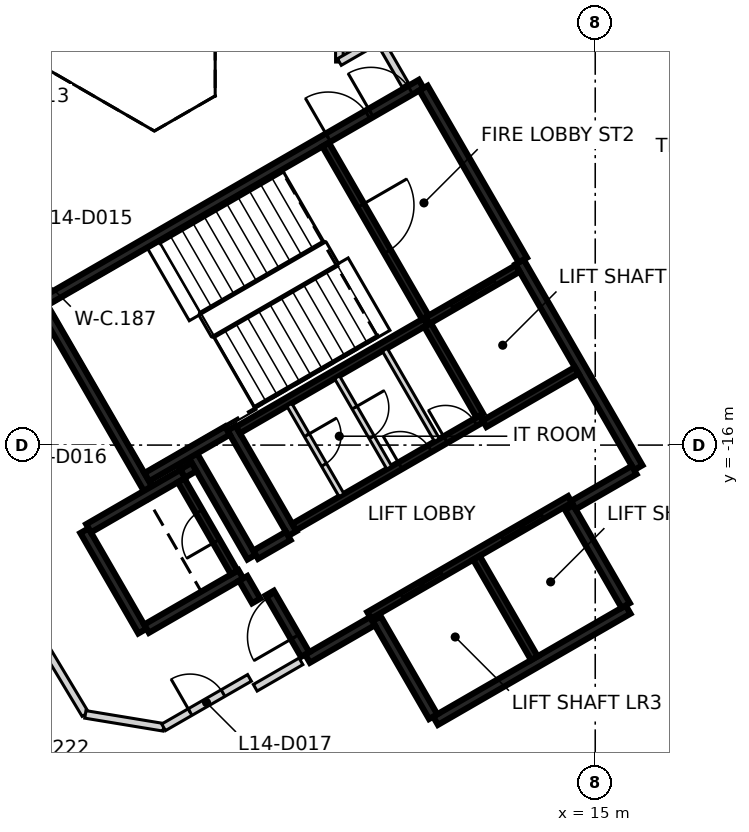
"""IFC4 building model, lengths in metres.
Left out: names, types, materials, properties, quantities, classifications, styles, units other than length and angle.
Written with IfcOpenShell. Run it as: python <this file> out.ifc"""

import sys

from ifc_helpers import new_model, si_unit, direction, frame, frame_2d, origin, place, context, subcontext, project, spatial, rectangle, extrude, element, fill, save


model = new_model("IFC4")
c1 = context("Model", 3, precision=1e-05, world=origin(), true_north=direction((0.0, 1.0)))
c2 = subcontext(c1, "Body", "Model", "MODEL_VIEW")
j1 = project(units=[si_unit("LENGTHUNIT", "METRE"), si_unit("PLANEANGLEUNIT", "RADIAN")], contexts=[c1])
p1 = place(None, origin())
s1 = spatial("IfcSite", under=j1, at=p1, CompositionType="ELEMENT")
p2 = place(p1, origin())
s2 = spatial("IfcBuilding", under=s1, at=p2, CompositionType="ELEMENT")
p3 = place(p2, frame((0.0, 0.0, 63.8)))
s3 = spatial("IfcBuildingStorey", under=s2, at=p3, CompositionType="ELEMENT", Elevation=63.8)
p4 = place(p3, frame((0.417, -12.273, 0.0), z_axis=(0.0, 0.0, 1.0), x_axis=(0.866021906294, 0.500006057782, 0.0)))
e1 = element("IfcWall", 1, at=p4, inside=s3, PredefinedType="SHEAR", context=c2, shape_type="SweptSolid", body=[
    extrude(rectangle(XDim=11.55, YDim=0.25, at=frame_2d((5.775, 0.0))), origin(), (0.0, 0.0, 1.0), 3.125),
])
p5 = place(p4, frame((10.025, 0.0, 0.0)))
e2 = element("IfcOpeningElement", 2, at=p5, cuts=e1, PredefinedType="OPENING", context=c2, shape_type="SweptSolid", body=[
    extrude(rectangle(XDim=1.2, YDim=2.1, at=frame_2d((0.6, 1.05))), frame((0.0, 0.135, 0.0), z_axis=(0.0, -1.0, 0.0), x_axis=(1.0, 0.0, 0.0)), (0.0, 0.0, 1.0), 0.27),
])
p6 = place(p4, frame((8.725, 0.0, 0.0)))
e3 = element("IfcOpeningElement", 3, at=p6, cuts=e1, PredefinedType="OPENING", context=c2, shape_type="SweptSolid", body=[
    extrude(rectangle(XDim=1.2, YDim=2.1, at=frame_2d((0.6, 1.05))), frame((0.0, 0.135, 0.0), z_axis=(0.0, -1.0, 0.0), x_axis=(1.0, 0.0, 0.0)), (0.0, 0.0, 1.0), 0.27),
])
p7 = place(p3, frame((13.008, -11.181, 0.0), z_axis=(0.0, 0.0, 1.0), x_axis=(0.500004234368, -0.866022959057, 0.0)))
e4 = element("IfcWall", 4, at=p7, inside=s3, PredefinedType="SHEAR", context=c2, shape_type="SweptSolid", body=[
    extrude(rectangle(XDim=6.25, YDim=0.25, at=frame_2d((3.125, 0.0))), origin(), (0.0, 0.0, 1.0), 3.125),
])
p8 = place(p3, frame((15.865, -20.328, 0.0), z_axis=(0.0, 0.0, 1.0), x_axis=(-0.86602852612, -0.499994591916, 0.0)))
e5 = element("IfcWall", 5, at=p8, inside=s3, PredefinedType="SHEAR", context=c2, shape_type="SweptSolid", body=[
    extrude(rectangle(XDim=5.85, YDim=0.25, at=frame_2d((2.925, 0.0))), origin(), (0.0, 0.0, 1.0), 3.125),
])
p9 = place(p3, frame((3.235, -17.153, 0.0), z_axis=(0.0, 0.0, 1.0), x_axis=(-0.500008851346, 0.866020293397, 0.0)))
e6 = element("IfcWall", 6, at=p9, inside=s3, PredefinedType="SHEAR", context=c2, shape_type="SweptSolid", body=[
    extrude(rectangle(XDim=5.51, YDim=0.25, at=frame_2d((2.755, 0.0))), origin(), (0.0, 0.0, 1.0), 3.125),
])
p10 = place(p3, frame((10.483, -6.606, 0.0), z_axis=(0.0, 0.0, 1.0), x_axis=(0.49999885962, -0.866026062182, 0.0)))
e7 = element("IfcWall", 7, at=p10, inside=s3, PredefinedType="SHEAR", context=c2, shape_type="SweptSolid", body=[
    extrude(rectangle(XDim=5.225, YDim=0.25, at=frame_2d((2.612, 0.0))), origin(), (0.0, 0.0, 1.0), 3.125),
])
p11 = place(p3, frame((7.031, -18.327, 0.0), z_axis=(0.0, 0.0, 1.0), x_axis=(-0.499971222258, 0.866042017984, 0.0)))
e8 = element("IfcWall", 8, at=p11, inside=s3, PredefinedType="SHEAR", context=c2, shape_type="SweptSolid", body=[
    extrude(rectangle(XDim=3.2, YDim=0.25, at=frame_2d((1.6, 0.0))), origin(), (0.0, 0.0, 1.0), 3.125),
])
for number, where, z_axis, x_axis in (
    (9, (14.315, -17.644, 0.0), (0.0, 0.0, 1.0), (0.5, -0.866, 0.0)),
    (10, (10.736, -23.145, 0.0), (0.0, 0.0, 1.0), (-0.5, 0.866, 0.0)),
):
    element("IfcWall", number, at=place(p3, frame(where, z_axis=z_axis, x_axis=x_axis)), inside=s3, PredefinedType="SHEAR", context=c2, shape_type="SweptSolid", body=[
        extrude(rectangle(XDim=2.974, YDim=0.25, at=frame_2d((1.487, 0.0))), origin(), (0.0, 0.0, 1.0), 3.125),
    ])
p12 = place(p3, frame((3.085, -20.894, 0.0), z_axis=(0.0, 0.0, 1.0), x_axis=(-0.499978833458, 0.866037623948, 0.0)))
e11 = element("IfcWall", 11, at=p12, inside=s3, PredefinedType="SHEAR", context=c2, shape_type="SweptSolid", body=[
    extrude(rectangle(XDim=3.05, YDim=0.25, at=frame_2d((1.525, 0.0))), origin(), (0.0, 0.0, 1.0), 3.125),
])
p13 = place(p3, frame((1.669, -18.19, 0.0), z_axis=(0.0, 0.0, 1.0), x_axis=(0.866042235819, 0.499970844928, 0.0)))
e12 = element("IfcWall", 12, at=p13, inside=s3, PredefinedType="SHEAR", context=c2, shape_type="SweptSolid", body=[
    extrude(rectangle(XDim=2.865, YDim=0.25, at=frame_2d((1.432, 0.0))), origin(), (0.0, 0.0, 1.0), 3.125),
])
p14 = place(p3, frame((5.675, -19.399, 0.0), z_axis=(0.0, 0.0, 1.0), x_axis=(-0.866026637627, -0.499997862916, 0.0)))
e13 = element("IfcWall", 13, at=p14, inside=s3, PredefinedType="SHEAR", context=c2, shape_type="SweptSolid", body=[
    extrude(rectangle(XDim=2.865, YDim=0.25, at=frame_2d((1.432, 0.0))), origin(), (0.0, 0.0, 1.0), 3.125),
])
p15 = place(p3, frame((4.414, -16.276, 0.0), z_axis=(0.0, 0.0, 1.0), x_axis=(0.500003324108, -0.866023484601, 0.0)))
e14 = element("IfcWall", 14, at=p15, inside=s3, PredefinedType="SHEAR", context=c2, shape_type="SweptSolid", body=[
    extrude(rectangle(XDim=3.085, YDim=0.25, at=frame_2d((1.542, 0.0))), origin(), (0.0, 0.0, 1.0), 3.125),
])
p16 = place(p3, frame((5.322, -15.619, 0.0), z_axis=(0.0, 0.0, 1.0), x_axis=(-0.866026229868, -0.499998569178, 0.0)))
e15 = element("IfcWall", 15, at=p16, inside=s3, PredefinedType="SHEAR", context=c2, shape_type="SweptSolid", body=[
    extrude(rectangle(XDim=2.449, YDim=0.25, at=frame_2d((1.225, 0.0))), origin(), (0.0, 0.0, 1.0), 3.125),
])
p17 = place(p3, frame((9.14, -20.631, 0.0), z_axis=(0.0, 0.0, 1.0), x_axis=(-0.866043531843, -0.499968599967, 0.0)))
e16 = element("IfcWall", 16, at=p17, inside=s3, PredefinedType="SHEAR", context=c2, shape_type="SweptSolid", body=[
    extrude(rectangle(XDim=1.975, YDim=0.25, at=frame_2d((0.987, 0.0))), origin(), (0.0, 0.0, 1.0), 3.125),
])
p18 = place(p3, frame((16.025, -16.656, 0.0), z_axis=(0.0, 0.0, 1.0), x_axis=(-0.866016279763, -0.500015802937, 0.0)))
e17 = element("IfcWall", 17, at=p18, inside=s3, PredefinedType="SHEAR", context=c2, shape_type="SweptSolid", body=[
    extrude(rectangle(XDim=1.849, YDim=0.25, at=frame_2d((0.925, 0.0))), origin(), (0.0, 0.0, 1.0), 3.125),
])
p19 = place(p3, frame((7.367, -21.51, 0.0), z_axis=(0.0, 0.0, 1.0), x_axis=(-0.499983108224, 0.866035156036, 0.0)))
e18 = element("IfcWall", 18, at=p19, inside=s3, PredefinedType="SHEAR", context=c2, shape_type="SweptSolid", body=[
    extrude(rectangle(XDim=1.865, YDim=0.25, at=frame_2d((0.932, 0.0))), origin(), (0.0, 0.0, 1.0), 3.125),
])
p20 = place(p19, frame((0.535, 0.0, 0.0)))
e19 = element("IfcOpeningElement", 19, at=p20, cuts=e18, PredefinedType="OPENING", context=c2, shape_type="SweptSolid", body=[
    extrude(rectangle(XDim=1.25, YDim=2.1, at=frame_2d((0.625, 1.05))), frame((0.0, 0.135, 0.0), z_axis=(0.0, -1.0, 0.0), x_axis=(1.0, 0.0, 0.0)), (0.0, 0.0, 1.0), 0.27),
])
p21 = place(p3, frame((6.065, -18.885, 0.0), z_axis=(0.0, 0.0, 1.0), x_axis=(0.866017078145, 0.500014420154, 0.0)))
e20 = element("IfcWall", 20, at=p21, inside=s3, PredefinedType="SHEAR", context=c2, shape_type="SweptSolid", body=[
    extrude(rectangle(XDim=0.989, YDim=0.25, at=frame_2d((0.495, 0.0))), origin(), (0.0, 0.0, 1.0), 3.125),
])
p22 = place(p3, frame((6.08, -20.1, 0.0), z_axis=(0.0, 0.0, 1.0), x_axis=(-0.500051773299, 0.865995510393, 0.0)))
e21 = element("IfcWall", 21, at=p22, inside=s3, PredefinedType="SHEAR", context=c2, shape_type="SweptSolid", body=[
    extrude(rectangle(XDim=0.685, YDim=0.25, at=frame_2d((0.342, 0.0))), origin(), (0.0, 0.0, 1.0), 3.125),
])
p23 = place(p3, frame((4.145, -16.749, 0.0), z_axis=(0.0, 0.0, 1.0), x_axis=(0.866185586049, 0.49972245349, 0.0)))
e22 = element("IfcWall", 22, at=p23, inside=s3, PredefinedType="SHEAR", context=c2, shape_type="SweptSolid", body=[
    extrude(rectangle(XDim=0.344, YDim=0.25, at=frame_2d((0.172, 0.0))), origin(), (0.0, 0.0, 1.0), 3.125),
])
p24 = place(p3, frame((9.052, -20.48, 0.0), z_axis=(0.0, 0.0, 1.0), x_axis=(0.866030299012, 0.499991521122, 0.0)))
e23 = element("IfcWall", 23, at=p24, inside=s3, PredefinedType="SHEAR", context=c2, shape_type="SweptSolid", body=[
    extrude(rectangle(XDim=6.1, YDim=0.2, at=frame_2d((3.05, 0.0))), origin(), (0.0, 0.0, 1.0), 3.125),
])
p25 = place(p24, frame((1.0, 0.0, 0.0)))
e24 = element("IfcOpeningElement", 24, at=p25, cuts=e23, PredefinedType="OPENING", context=c2, shape_type="SweptSolid", body=[
    extrude(rectangle(XDim=1.2, YDim=2.1, at=frame_2d((0.6, 1.05))), frame((0.0, 0.11, 0.0), z_axis=(0.0, -1.0, 0.0), x_axis=(1.0, 0.0, 0.0)), (0.0, 0.0, 1.0), 0.22),
])
p26 = place(p24, frame((4.05, 0.0, 0.0)))
e25 = element("IfcOpeningElement", 25, at=p26, cuts=e23, PredefinedType="OPENING", context=c2, shape_type="SweptSolid", body=[
    extrude(rectangle(XDim=1.2, YDim=2.1, at=frame_2d((0.6, 1.05))), frame((0.0, 0.11, 0.0), z_axis=(0.0, -1.0, 0.0), x_axis=(1.0, 0.0, 0.0)), (0.0, 0.0, 1.0), 0.22),
])
p27 = place(p3, frame((10.538, -12.752, 0.0), z_axis=(0.0, 0.0, 1.0), x_axis=(-0.866038630372, -0.499977090179, 0.0)))
e26 = element("IfcWall", 26, at=p27, inside=s3, PredefinedType="SHEAR", context=c2, shape_type="SweptSolid", body=[
    extrude(rectangle(XDim=5.699, YDim=0.2, at=frame_2d((2.85, 0.0))), origin(), (0.0, 0.0, 1.0), 3.125),
])
p28 = place(p3, frame((7.077, -18.156, 0.0), z_axis=(0.0, 0.0, 1.0), x_axis=(0.866038630372, 0.499977090179, 0.0)))
e27 = element("IfcWall", 27, at=p28, inside=s3, PredefinedType="SHEAR", context=c2, shape_type="SweptSolid", body=[
    extrude(rectangle(XDim=5.699, YDim=0.2, at=frame_2d((2.85, 0.0))), origin(), (0.0, 0.0, 1.0), 3.125),
])
p29 = place(p28, frame((3.224, 0.0, 0.0)))
e28 = element("IfcOpeningElement", 28, at=p29, cuts=e27, PredefinedType="OPENING", context=c2, shape_type="SweptSolid", body=[
    extrude(rectangle(XDim=0.9, YDim=2.1, at=frame_2d((0.45, 1.05))), frame((0.0, 0.11, 0.0), z_axis=(0.0, -1.0, 0.0), x_axis=(1.0, 0.0, 0.0)), (0.0, 0.0, 1.0), 0.22),
])
p30 = place(p28, frame((4.599, 0.0, 0.0)))
e29 = element("IfcOpeningElement", 29, at=p30, cuts=e27, PredefinedType="OPENING", context=c2, shape_type="SweptSolid", body=[
    extrude(rectangle(XDim=0.9, YDim=2.1, at=frame_2d((0.45, 1.05))), frame((0.0, 0.11, 0.0), z_axis=(0.0, -1.0, 0.0), x_axis=(1.0, 0.0, 0.0)), (0.0, 0.0, 1.0), 0.22),
])
p31 = place(p3, frame((7.906, -8.094, 0.0), z_axis=(0.0, 0.0, 1.0), x_axis=(0.500024287448, -0.866011380966, 0.0)))
e30 = element("IfcWall", 30, at=p31, inside=s3, PredefinedType="SHEAR", context=c2, shape_type="SweptSolid", body=[
    extrude(rectangle(XDim=5.251, YDim=0.2, at=frame_2d((2.625, 0.0))), origin(), (0.0, 0.0, 1.0), 3.125),
])
p32 = place(p31, frame((1.849, 0.0, 0.0)))
e31 = element("IfcOpeningElement", 31, at=p32, cuts=e30, PredefinedType="OPENING", context=c2, shape_type="SweptSolid", body=[
    extrude(rectangle(XDim=1.4, YDim=2.1, at=frame_2d((0.7, 1.05))), frame((0.0, 0.11, 0.0), z_axis=(0.0, -1.0, 0.0), x_axis=(1.0, 0.0, 0.0)), (0.0, 0.0, 1.0), 0.22),
])
p33 = place(p3, frame((11.875, -18.967, 0.0), z_axis=(0.0, 0.0, 1.0), x_axis=(0.49998131003, -0.866036194175, 0.0)))
e32 = element("IfcWall", 32, at=p33, inside=s3, PredefinedType="SHEAR", context=c2, shape_type="SweptSolid", body=[
    extrude(rectangle(XDim=3.048, YDim=0.2, at=frame_2d((1.524, 0.0))), origin(), (0.0, 0.0, 1.0), 3.125),
])
p34 = place(p3, frame((5.503, -19.352, 0.0), z_axis=(0.0, 0.0, 1.0), x_axis=(-0.499986818241, 0.866033014143, 0.0)))
e33 = element("IfcWall", 33, at=p34, inside=s3, PredefinedType="SHEAR", context=c2, shape_type="SweptSolid", body=[
    extrude(rectangle(XDim=2.798, YDim=0.2, at=frame_2d((1.399, 0.0))), origin(), (0.0, 0.0, 1.0), 3.125),
])
p35 = place(p34, frame((0.949, 0.0, 0.0)))
e34 = element("IfcOpeningElement", 34, at=p35, cuts=e33, PredefinedType="OPENING", context=c2, shape_type="SweptSolid", body=[
    extrude(rectangle(XDim=0.9, YDim=2.1, at=frame_2d((0.45, 1.05))), frame((0.0, 0.11, 0.0), z_axis=(0.0, -1.0, 0.0), x_axis=(1.0, 0.0, 0.0)), (0.0, 0.0, 1.0), 0.22),
])
p36 = place(p3, frame((11.963, -15.22, 0.0), z_axis=(0.0, 0.0, 1.0), x_axis=(-0.500034990121, 0.866005201286, 0.0)))
e35 = element("IfcWall", 35, at=p36, inside=s3, PredefinedType="SHEAR", context=c2, shape_type="SweptSolid", body=[
    extrude(rectangle(XDim=2.75, YDim=0.2, at=frame_2d((1.375, 0.0))), origin(), (0.0, 0.0, 1.0), 3.125),
])
p37 = place(p3, frame((10.587, -12.723, 0.0), z_axis=(0.0, 0.0, 1.0), x_axis=(0.866037306777, 0.499979382845, 0.0)))
e36 = element("IfcWall", 36, at=p37, inside=s3, PredefinedType="SHEAR", context=c2, shape_type="SweptSolid", body=[
    extrude(rectangle(XDim=2.742, YDim=0.2, at=frame_2d((1.371, 0.0))), origin(), (0.0, 0.0, 1.0), 3.125),
])
p38 = place(p37, frame((0.743, 0.0, 0.0)))
e37 = element("IfcOpeningElement", 37, at=p38, cuts=e36, PredefinedType="OPENING", context=c2, shape_type="SweptSolid", body=[
    extrude(rectangle(XDim=1.3, YDim=2.1, at=frame_2d((0.65, 1.05))), frame((0.0, 0.11, 0.0), z_axis=(0.0, -1.0, 0.0), x_axis=(1.0, 0.0, 0.0)), (0.0, 0.0, 1.0), 0.22),
])
p39 = place(p3, frame((14.512, -14.037, 0.0), z_axis=(0.0, 0.0, 1.0), x_axis=(-0.866044696403, -0.499966582715, 0.0)))
e38 = element("IfcWall", 38, at=p39, inside=s3, PredefinedType="SHEAR", context=c2, shape_type="SweptSolid", body=[
    extrude(rectangle(XDim=2.799, YDim=0.2, at=frame_2d((1.399, 0.0))), origin(), (0.0, 0.0, 1.0), 3.125),
])
p40 = place(p3, frame((8.207, -14.214, 0.0), z_axis=(0.0, 0.0, 1.0), x_axis=(0.50002746344, -0.86600954718, 0.0)))
e39 = element("IfcWall", 39, at=p40, inside=s3, PredefinedType="PARTITIONING", context=c2, shape_type="SweptSolid", body=[
    extrude(rectangle(XDim=2.748, YDim=0.15, at=frame_2d((1.374, 0.0))), origin(), (0.0, 0.0, 1.0), 3.125),
])
p41 = place(p40, frame((0.924, 0.0, 0.0)))
e40 = element("IfcOpeningElement", 40, at=p41, cuts=e39, PredefinedType="OPENING", context=c2, shape_type="SweptSolid", body=[
    extrude(rectangle(XDim=0.9, YDim=2.1, at=frame_2d((0.45, 1.05))), frame((0.0, 0.085, 0.0), z_axis=(0.0, -1.0, 0.0), x_axis=(1.0, 0.0, 0.0)), (0.0, 0.0, 1.0), 0.17),
])
p42 = place(p3, frame((9.462, -13.489, 0.0), z_axis=(0.0, 0.0, 1.0), x_axis=(0.499988999718, -0.866031754707, 0.0)))
e41 = element("IfcWall", 41, at=p42, inside=s3, PredefinedType="PARTITIONING", context=c2, shape_type="SweptSolid", body=[
    extrude(rectangle(XDim=2.749, YDim=0.15, at=frame_2d((1.374, 0.0))), origin(), (0.0, 0.0, 1.0), 3.125),
])
p43 = place(p3, frame((6.951, -14.939, 0.0), z_axis=(0.0, 0.0, 1.0), x_axis=(0.499988999718, -0.866031754707, 0.0)))
e42 = element("IfcWall", 42, at=p43, inside=s3, PredefinedType="PARTITIONING", context=c2, shape_type="SweptSolid", body=[
    extrude(rectangle(XDim=2.749, YDim=0.15, at=frame_2d((1.374, 0.0))), origin(), (0.0, 0.0, 1.0), 3.125),
])
p44 = place(p43, frame((0.924, 0.0, 0.0)))
e43 = element("IfcOpeningElement", 43, at=p44, cuts=e42, PredefinedType="OPENING", context=c2, shape_type="SweptSolid", body=[
    extrude(rectangle(XDim=0.9, YDim=2.1, at=frame_2d((0.45, 1.05))), frame((0.0, 0.085, 0.0), z_axis=(0.0, -1.0, 0.0), x_axis=(1.0, 0.0, 0.0)), (0.0, 0.0, 1.0), 0.17),
])
p45 = place(p3, frame((-0.858, -19.017, 0.0), z_axis=(0.0, 0.0, 1.0), x_axis=(0.514647068805, -0.857402119528, 0.0)))
e44 = element("IfcWall", 44, at=p45, inside=s3, PredefinedType="PARTITIONING", context=c2, shape_type="SweptSolid", body=[
    extrude(rectangle(XDim=4.745, YDim=0.2, at=frame_2d((2.373, 0.0))), origin(), (0.0, 0.0, 1.0), 3.125),
])
p46 = place(p3, frame((1.584, -23.086, 0.0), z_axis=(0.0, 0.0, 1.0), x_axis=(0.986633159246, -0.162957077405, 0.0)))
e45 = element("IfcWall", 45, at=p46, inside=s3, PredefinedType="PARTITIONING", context=c2, shape_type="SweptSolid", body=[
    extrude(rectangle(XDim=2.087, YDim=0.2, at=frame_2d((1.043, 0.0))), origin(), (0.0, 0.0, 1.0), 3.125),
])
p47 = place(p3, frame((3.643, -23.426, 0.0), z_axis=(0.0, 0.0, 1.0), x_axis=(0.866654350985, 0.498909045738, 0.0)))
e46 = element("IfcWall", 46, at=p47, inside=s3, PredefinedType="PARTITIONING", context=c2, shape_type="SweptSolid", body=[
    extrude(rectangle(XDim=2.608, YDim=0.2, at=frame_2d((1.304, 0.0))), origin(), (0.0, 0.0, 1.0), 3.125),
])
p48 = place(p47, frame((0.804, 0.0, 0.0)))
e47 = element("IfcOpeningElement", 47, at=p48, cuts=e46, PredefinedType="OPENING", context=c2, shape_type="SweptSolid", body=[
    extrude(rectangle(XDim=1.0, YDim=2.1, at=frame_2d((0.5, 1.05))), frame((0.0, 0.11, 0.0), z_axis=(0.0, -1.0, 0.0), x_axis=(1.0, 0.0, 0.0)), (0.0, 0.0, 1.0), 0.22),
])
p49 = place(p3, frame((6.054, -22.385, 0.0), z_axis=(0.0, 0.0, 1.0), x_axis=(0.86593101922, 0.500163443238, 0.0)))
e48 = element("IfcWall", 48, at=p49, inside=s3, PredefinedType="PARTITIONING", context=c2, shape_type="SweptSolid", body=[
    extrude(rectangle(XDim=1.39, YDim=0.2, at=frame_2d((0.695, 0.0))), origin(), (0.0, 0.0, 1.0), 3.125),
])
p50 = place(p3, frame((8.268, -5.921, 0.0), z_axis=(0.0, 0.0, 1.0), x_axis=(0.0, 1.0, 0.0)))
e49 = element("IfcWall", 49, at=p50, inside=s3, PredefinedType="PARTITIONING", context=c2, shape_type="SweptSolid", body=[
    extrude(rectangle(XDim=1.2, YDim=0.2, at=frame_2d((0.6, 0.0))), origin(), (0.0, 0.0, 1.0), 3.125),
])
p51 = place(p3, frame((8.268, -5.921, 0.0), z_axis=(0.0, 0.0, 1.0), x_axis=(0.866344856625, 0.499446282797, 0.0)))
e50 = element("IfcWall", 50, at=p51, inside=s3, PredefinedType="PARTITIONING", context=c2, shape_type="SweptSolid", body=[
    extrude(rectangle(XDim=1.199, YDim=0.2, at=frame_2d((0.6, 0.0))), origin(), (0.0, 0.0, 1.0), 3.125),
])
p52 = place(p3, frame((9.307, -5.322, 0.0), z_axis=(0.0, 0.0, 1.0), x_axis=(0.500295157811, -0.865854927266, 0.0)))
e51 = element("IfcWall", 51, at=p52, inside=s3, PredefinedType="PARTITIONING", context=c2, shape_type="SweptSolid", body=[
    extrude(rectangle(XDim=1.39, YDim=0.2, at=frame_2d((0.695, 0.0))), origin(), (0.0, 0.0, 1.0), 3.125),
])
p53 = place(p38, origin())
e52 = element("IfcDoor", 52, at=p53, inside=s3, OperationType="SLIDING_TO_LEFT", PredefinedType="DOOR", context=c2, shape_type="SweptSolid", body=[
    extrude(rectangle(XDim=1.3, YDim=2.1, at=frame_2d((0.65, 1.05))), frame((0.0, 0.025, 0.0), z_axis=(0.0, -1.0, 0.0), x_axis=(1.0, 0.0, 0.0)), (0.0, 0.0, 1.0), 0.05),
])
fill(e37, e52)
p54 = place(p25, origin())
e53 = element("IfcDoor", 53, at=p54, inside=s3, OperationType="DOUBLE_DOOR_SLIDING", PredefinedType="DOOR", context=c2, shape_type="SweptSolid", body=[
    extrude(rectangle(XDim=1.2, YDim=2.1, at=frame_2d((0.6, 1.05))), frame((0.0, 0.025, 0.0), z_axis=(0.0, -1.0, 0.0), x_axis=(1.0, 0.0, 0.0)), (0.0, 0.0, 1.0), 0.05),
])
fill(e24, e53)
p55 = place(p26, origin())
e54 = element("IfcDoor", 54, at=p55, inside=s3, OperationType="DOUBLE_DOOR_SLIDING", PredefinedType="DOOR", context=c2, shape_type="SweptSolid", body=[
    extrude(rectangle(XDim=1.2, YDim=2.1, at=frame_2d((0.6, 1.05))), frame((0.0, 0.025, 0.0), z_axis=(0.0, -1.0, 0.0), x_axis=(1.0, 0.0, 0.0)), (0.0, 0.0, 1.0), 0.05),
])
fill(e25, e54)
p56 = place(p20, origin())
e55 = element("IfcDoor", 55, at=p56, inside=s3, OperationType="SINGLE_SWING_LEFT", PredefinedType="DOOR", context=c2, shape_type="SweptSolid", body=[
    extrude(rectangle(XDim=1.25, YDim=2.1, at=frame_2d((0.625, 1.05))), frame((0.0, 0.025, 0.0), z_axis=(0.0, -1.0, 0.0), x_axis=(1.0, 0.0, 0.0)), (0.0, 0.0, 1.0), 0.05),
])
fill(e19, e55)
p57 = place(p5, origin())
e56 = element("IfcDoor", 56, at=p57, inside=s3, OperationType="SINGLE_SWING_LEFT", PredefinedType="DOOR", context=c2, shape_type="SweptSolid", body=[
    extrude(rectangle(XDim=1.2, YDim=2.1, at=frame_2d((0.6, 1.05))), frame((0.0, 0.025, 0.0), z_axis=(0.0, -1.0, 0.0), x_axis=(1.0, 0.0, 0.0)), (0.0, 0.0, 1.0), 0.05),
])
fill(e2, e56)
p58 = place(p6, origin())
e57 = element("IfcDoor", 57, at=p58, inside=s3, OperationType="SINGLE_SWING_RIGHT", PredefinedType="DOOR", context=c2, shape_type="SweptSolid", body=[
    extrude(rectangle(XDim=1.2, YDim=2.1, at=frame_2d((0.6, 1.05))), frame((0.0, 0.025, 0.0), z_axis=(0.0, -1.0, 0.0), x_axis=(1.0, 0.0, 0.0)), (0.0, 0.0, 1.0), 0.05),
])
fill(e3, e57)
p59 = place(p32, origin())
e58 = element("IfcDoor", 58, at=p59, inside=s3, OperationType="SINGLE_SWING_LEFT", PredefinedType="DOOR", context=c2, shape_type="SweptSolid", body=[
    extrude(rectangle(XDim=1.4, YDim=2.1, at=frame_2d((0.7, 1.05))), frame((0.0, 0.025, 0.0), z_axis=(0.0, -1.0, 0.0), x_axis=(1.0, 0.0, 0.0)), (0.0, 0.0, 1.0), 0.05),
])
fill(e31, e58)
p60 = place(p29, origin())
e59 = element("IfcDoor", 59, at=p60, inside=s3, OperationType="SINGLE_SWING_RIGHT", PredefinedType="DOOR", context=c2, shape_type="SweptSolid", body=[
    extrude(rectangle(XDim=0.9, YDim=2.1, at=frame_2d((0.45, 1.05))), frame((0.0, 0.025, 0.0), z_axis=(0.0, -1.0, 0.0), x_axis=(1.0, 0.0, 0.0)), (0.0, 0.0, 1.0), 0.05),
])
fill(e28, e59)
p61 = place(p30, origin())
e60 = element("IfcDoor", 60, at=p61, inside=s3, OperationType="SINGLE_SWING_LEFT", PredefinedType="DOOR", context=c2, shape_type="SweptSolid", body=[
    extrude(rectangle(XDim=0.9, YDim=2.1, at=frame_2d((0.45, 1.05))), frame((0.0, 0.025, 0.0), z_axis=(0.0, -1.0, 0.0), x_axis=(1.0, 0.0, 0.0)), (0.0, 0.0, 1.0), 0.05),
])
fill(e29, e60)
p62 = place(p35, origin())
e61 = element("IfcDoor", 61, at=p62, inside=s3, OperationType="SINGLE_SWING_RIGHT", PredefinedType="DOOR", context=c2, shape_type="SweptSolid", body=[
    extrude(rectangle(XDim=0.9, YDim=2.1, at=frame_2d((0.45, 1.05))), frame((0.0, 0.025, 0.0), z_axis=(0.0, -1.0, 0.0), x_axis=(1.0, 0.0, 0.0)), (0.0, 0.0, 1.0), 0.05),
])
fill(e34, e61)
p63 = place(p41, origin())
e62 = element("IfcDoor", 62, at=p63, inside=s3, OperationType="SINGLE_SWING_LEFT", PredefinedType="DOOR", context=c2, shape_type="SweptSolid", body=[
    extrude(rectangle(XDim=0.9, YDim=2.1, at=frame_2d((0.45, 1.05))), frame((0.0, 0.025, 0.0), z_axis=(0.0, -1.0, 0.0), x_axis=(1.0, 0.0, 0.0)), (0.0, 0.0, 1.0), 0.05),
])
fill(e40, e62)
p64 = place(p44, origin())
e63 = element("IfcDoor", 63, at=p64, inside=s3, OperationType="SINGLE_SWING_RIGHT", PredefinedType="DOOR", context=c2, shape_type="SweptSolid", body=[
    extrude(rectangle(XDim=0.9, YDim=2.1, at=frame_2d((0.45, 1.05))), frame((0.0, 0.025, 0.0), z_axis=(0.0, -1.0, 0.0), x_axis=(1.0, 0.0, 0.0)), (0.0, 0.0, 1.0), 0.05),
])
fill(e43, e63)
p65 = place(p48, frame((1.0, 0.0, 0.0), z_axis=(0.0, 0.0, 1.0), x_axis=(-1.0, 0.0, 0.0)))
e64 = element("IfcDoor", 64, at=p65, inside=s3, OperationType="SINGLE_SWING_LEFT", PredefinedType="DOOR", context=c2, shape_type="SweptSolid", body=[
    extrude(rectangle(XDim=1.0, YDim=2.1, at=frame_2d((0.5, 1.05))), frame((0.0, 0.025, 0.0), z_axis=(0.0, -1.0, 0.0), x_axis=(1.0, 0.0, 0.0)), (0.0, 0.0, 1.0), 0.05),
])
fill(e47, e64)
save(model, sys.argv[1])
